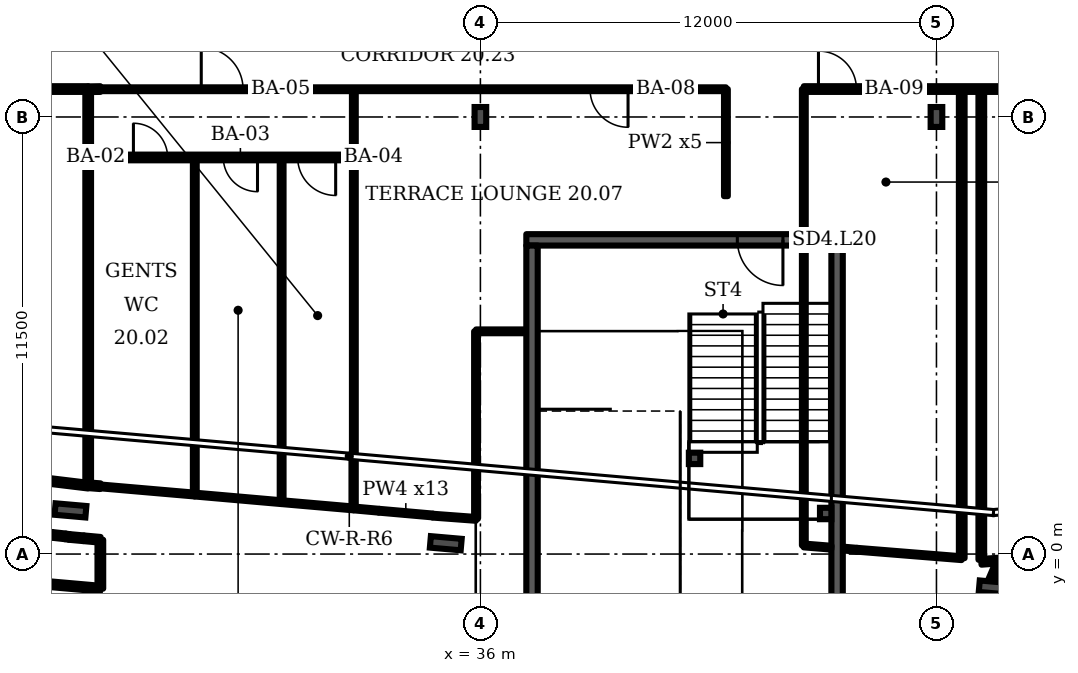
"""IFC4 building model, lengths in metres.
Left out: names, types, materials, properties, quantities, classifications, styles, units other than length and angle.
Written with IfcOpenShell. Run it as: python <this file> out.ifc"""

import sys

from ifc_helpers import new_model, si_unit, direction, frame, frame_2d, origin, origin_2d, place, context, subcontext, project, spatial, rectangle, i_section, extrude, element, fill, save


model = new_model("IFC4")
c1 = context("Model", 3, precision=1e-05, world=origin(), true_north=direction((0.0, 1.0)))
c2 = subcontext(c1, "Body", "Model", "MODEL_VIEW")
j1 = project(units=[si_unit("LENGTHUNIT", "METRE"), si_unit("PLANEANGLEUNIT", "RADIAN")], contexts=[c1])
p1 = place(None, origin())
s1 = spatial("IfcSite", under=j1, at=p1, CompositionType="ELEMENT")
p2 = place(p1, origin())
s2 = spatial("IfcBuilding", under=s1, at=p2, CompositionType="ELEMENT")
p3 = place(p2, frame((0.0, 0.0, 91.9)))
s3 = spatial("IfcBuildingStorey", under=s2, at=p3, CompositionType="ELEMENT", Elevation=91.9)
for number, where, z_axis, x_axis in (
    (1, (25.214, 1.149, 0.0), (0.0, 0.0, 1.0), (-0.087, -0.996, 0.0)),
    (2, (35.089, 0.285, 0.0), (0.0, 0.0, 1.0), (-0.087, -0.996, 0.0)),
    (3, (49.531, -0.882, 0.0), (0.0, 0.0, 1.0), (-0.087, -0.996, 0.0)),
):
    element("IfcColumn", number, at=place(p3, frame(where, z_axis=z_axis, x_axis=x_axis)), inside=s3, PredefinedType="COLUMN", context=c2, shape_type="SweptSolid", body=[
        extrude(i_section(OverallWidth=0.303, OverallDepth=0.814, WebThickness=0.021, FlangeThickness=0.04, FilletRadius=0.03, at=origin_2d()), origin(), (0.0, 0.0, 1.0), 4.8),
    ])
for number, where, z_axis, x_axis in (
    (4, (36.0, 11.5, 0.0), (0.0, 0.0, 1.0), (1.0, 0.0, 0.0)),
    (5, (48.0, 11.5, 0.0), (0.0, 0.0, 1.0), (1.0, 0.0, 0.0)),
):
    element("IfcColumn", number, at=place(p3, frame(where, z_axis=z_axis, x_axis=x_axis)), inside=s3, PredefinedType="COLUMN", context=c2, shape_type="SweptSolid", body=[
        extrude(i_section(OverallWidth=0.306, OverallDepth=0.524, WebThickness=0.021, FlangeThickness=0.04, FilletRadius=0.027, at=origin_2d()), origin(), (0.0, 0.0, 1.0), 4.8),
    ])
p4 = place(p3, frame((37.208, 8.267, 0.0), z_axis=(0.0, 0.0, 1.0), x_axis=(1.0, 0.0, 0.0)))
e6 = element("IfcWall", 6, at=p4, inside=s3, PredefinedType="SHEAR", context=c2, shape_type="SweptSolid", body=[
    extrude(rectangle(XDim=8.327, YDim=0.3, at=frame_2d((4.164, 0.0))), origin(), (0.0, 0.0, 1.0), 4.4),
])
p5 = place(p4, frame((5.552, 0.0, 0.0)))
e7 = element("IfcOpeningElement", 7, at=p5, cuts=e6, PredefinedType="OPENING", context=c2, shape_type="SweptSolid", body=[
    extrude(rectangle(XDim=1.2, YDim=2.1, at=frame_2d((0.6, 1.05))), frame((0.0, 0.16, 0.0), z_axis=(0.0, -1.0, 0.0), x_axis=(1.0, 0.0, 0.0)), (0.0, 0.0, 1.0), 0.32),
])
p6 = place(p3, frame((0.02, 12.235, 0.0), z_axis=(0.0, 0.0, 1.0), x_axis=(1.0, 0.0, 0.0)))
e8 = element("IfcWall", 8, at=p6, inside=s3, PredefinedType="PARTITIONING", context=c2, shape_type="SweptSolid", body=[
    extrude(rectangle(XDim=25.66, YDim=0.15, at=frame_2d((12.83, 0.0))), origin(), (0.0, 0.0, 1.0), 4.4),
])
p7 = place(p6, frame((5.805, 0.0, 0.0)))
e9 = element("IfcOpeningElement", 9, at=p7, cuts=e8, PredefinedType="OPENING", context=c2, shape_type="SweptSolid", body=[
    extrude(rectangle(XDim=1.0, YDim=2.1, at=frame_2d((0.5, 1.05))), frame((0.0, 0.085, 0.0), z_axis=(0.0, -1.0, 0.0), x_axis=(1.0, 0.0, 0.0)), (0.0, 0.0, 1.0), 0.17),
])
p8 = place(p6, frame((18.675, 0.0, 0.0)))
e10 = element("IfcOpeningElement", 10, at=p8, cuts=e8, PredefinedType="OPENING", context=c2, shape_type="SweptSolid", body=[
    extrude(rectangle(XDim=1.0, YDim=2.1, at=frame_2d((0.5, 1.05))), frame((0.0, 0.085, 0.0), z_axis=(0.0, -1.0, 0.0), x_axis=(1.0, 0.0, 0.0)), (0.0, 0.0, 1.0), 0.17),
])
p9 = place(p3, frame((24.725, 0.505, 0.0), z_axis=(0.0, 0.0, 1.0), x_axis=(-0.992649, 0.121018, 0.0)))
e11 = element("IfcWall", 11, at=p9, inside=s3, PredefinedType="PARTITIONING", context=c2, shape_type="SweptSolid", body=[
    extrude(rectangle(XDim=10.371, YDim=0.15, at=frame_2d((5.186, 0.0))), origin(), (0.0, 0.0, 1.0), 4.4),
])
p10 = place(p3, frame((25.08, 0.465, 0.0), z_axis=(0.0, 0.0, 1.0), x_axis=(-0.993778, 0.111407, 0.0)))
e12 = element("IfcWall", 12, at=p10, inside=s3, PredefinedType="PARTITIONING", context=c2, shape_type="SweptSolid", body=[
    extrude(rectangle(XDim=0.357, YDim=0.15, at=frame_2d((0.179, 0.0))), origin(), (0.0, 0.0, 1.0), 4.4),
])
p11 = place(p3, frame((25.18, 0.45, 0.0), z_axis=(0.0, 0.0, 1.0), x_axis=(-0.988705, 0.149877, 0.0)))
e13 = element("IfcWall", 13, at=p11, inside=s3, PredefinedType="PARTITIONING", context=c2, shape_type="SweptSolid", body=[
    extrude(rectangle(XDim=0.101, YDim=0.15, at=frame_2d((0.051, 0.0))), origin(), (0.0, 0.0, 1.0), 4.4),
])
p12 = place(p3, frame((25.56, 0.415, 0.0), z_axis=(0.0, 0.0, 1.0), x_axis=(-0.995805, 0.091458, 0.0)))
e14 = element("IfcWall", 14, at=p12, inside=s3, PredefinedType="PARTITIONING", context=c2, shape_type="SweptSolid", body=[
    extrude(rectangle(XDim=0.382, YDim=0.15, at=frame_2d((0.191, 0.0))), origin(), (0.0, 0.0, 1.0), 4.4),
])
p13 = place(p3, frame((25.68, 1.8, 0.0), z_axis=(0.0, 0.0, 1.0), x_axis=(-0.992758, 0.12014, 0.0)))
e15 = element("IfcWall", 15, at=p13, inside=s3, PredefinedType="PARTITIONING", context=c2, shape_type="SweptSolid", body=[
    extrude(rectangle(XDim=11.691, YDim=0.15, at=frame_2d((5.845, 0.0))), origin(), (0.0, 0.0, 1.0), 4.4),
])
p14 = place(p3, frame((25.68, 1.81, 0.0), z_axis=(0.0, 0.0, 1.0), x_axis=(0.0, 1.0, 0.0)))
e16 = element("IfcWall", 16, at=p14, inside=s3, PredefinedType="PARTITIONING", context=c2, shape_type="SweptSolid", body=[
    extrude(rectangle(XDim=10.42, YDim=0.15, at=frame_2d((5.21, 0.0))), origin(), (0.0, 0.0, 1.0), 4.4),
])
p15 = place(p3, frame((25.68, 10.435, 0.0), z_axis=(0.0, 0.0, 1.0), x_axis=(1.0, 0.0, 0.0)))
e17 = element("IfcWall", 17, at=p15, inside=s3, PredefinedType="PARTITIONING", context=c2, shape_type="SweptSolid", body=[
    extrude(rectangle(XDim=6.985, YDim=0.15, at=frame_2d((3.493, 0.0))), origin(), (0.0, 0.0, 1.0), 4.4),
])
p16 = place(p15, frame((1.19, 0.0, 0.0)))
e18 = element("IfcOpeningElement", 18, at=p16, cuts=e17, PredefinedType="OPENING", context=c2, shape_type="SweptSolid", body=[
    extrude(rectangle(XDim=0.9, YDim=2.1, at=frame_2d((0.45, 1.05))), frame((0.0, 0.085, 0.0), z_axis=(0.0, -1.0, 0.0), x_axis=(1.0, 0.0, 0.0)), (0.0, 0.0, 1.0), 0.17),
])
p17 = place(p15, frame((3.555, 0.0, 0.0)))
e19 = element("IfcOpeningElement", 19, at=p17, cuts=e17, PredefinedType="OPENING", context=c2, shape_type="SweptSolid", body=[
    extrude(rectangle(XDim=0.9, YDim=2.1, at=frame_2d((0.45, 1.05))), frame((0.0, 0.085, 0.0), z_axis=(0.0, -1.0, 0.0), x_axis=(1.0, 0.0, 0.0)), (0.0, 0.0, 1.0), 0.17),
])
p18 = place(p15, frame((5.512, 0.0, 0.0)))
e20 = element("IfcOpeningElement", 20, at=p18, cuts=e17, PredefinedType="OPENING", context=c2, shape_type="SweptSolid", body=[
    extrude(rectangle(XDim=1.0, YDim=2.1, at=frame_2d((0.5, 1.05))), frame((0.0, 0.085, 0.0), z_axis=(0.0, -1.0, 0.0), x_axis=(1.0, 0.0, 0.0)), (0.0, 0.0, 1.0), 0.17),
])
p19 = place(p3, frame((25.68, 12.23, 0.0), z_axis=(0.0, 0.0, 1.0), x_axis=(0.999868, 0.016016, 0.0)))
e21 = element("IfcWall", 21, at=p19, inside=s3, PredefinedType="PARTITIONING", context=c2, shape_type="SweptSolid", body=[
    extrude(rectangle(XDim=0.32, YDim=0.15, at=frame_2d((0.16, 0.0))), origin(), (0.0, 0.0, 1.0), 4.4),
])
p20 = place(p3, frame((26.0, -0.91, 0.0), z_axis=(0.0, 0.0, 1.0), x_axis=(0.0, 1.0, 0.0)))
e22 = element("IfcWall", 22, at=p20, inside=s3, PredefinedType="PARTITIONING", context=c2, shape_type="SweptSolid", body=[
    extrude(rectangle(XDim=1.285, YDim=0.15, at=frame_2d((0.643, 0.0))), origin(), (0.0, 0.0, 1.0), 4.4),
])
p21 = place(p3, frame((26.0, -0.91, 0.0), z_axis=(0.0, 0.0, 1.0), x_axis=(-0.996159, 0.087597, 0.0)))
e23 = element("IfcWall", 23, at=p21, inside=s3, PredefinedType="PARTITIONING", context=c2, shape_type="SweptSolid", body=[
    extrude(rectangle(XDim=6.068, YDim=0.15, at=frame_2d((3.034, 0.0))), origin(), (0.0, 0.0, 1.0), 4.4),
])
p22 = place(p3, frame((26.0, 0.375, 0.0), z_axis=(0.0, 0.0, 1.0), x_axis=(-0.99588, 0.090635, 0.0)))
e24 = element("IfcWall", 24, at=p22, inside=s3, PredefinedType="PARTITIONING", context=c2, shape_type="SweptSolid", body=[
    extrude(rectangle(XDim=0.442, YDim=0.15, at=frame_2d((0.221, 0.0))), origin(), (0.0, 0.0, 1.0), 4.4),
])
p23 = place(p3, frame((26.0, 12.23, 0.0), z_axis=(0.0, 0.0, 1.0), x_axis=(1.0, 0.0, 0.0)))
e25 = element("IfcWall", 25, at=p23, inside=s3, PredefinedType="PARTITIONING", context=c2, shape_type="SweptSolid", body=[
    extrude(rectangle(XDim=16.46, YDim=0.1, at=frame_2d((8.23, 0.0))), origin(), (0.0, 0.0, 1.0), 4.4),
])
p24 = place(p23, frame((2.655, 0.0, 0.0)))
e26 = element("IfcOpeningElement", 26, at=p24, cuts=e25, PredefinedType="OPENING", context=c2, shape_type="SweptSolid", body=[
    extrude(rectangle(XDim=1.1, YDim=2.1, at=frame_2d((0.55, 1.05))), frame((0.0, 0.06, 0.0), z_axis=(0.0, -1.0, 0.0), x_axis=(1.0, 0.0, 0.0)), (0.0, 0.0, 1.0), 0.12),
])
p25 = place(p23, frame((12.885, 0.0, 0.0)))
e27 = element("IfcOpeningElement", 27, at=p25, cuts=e25, PredefinedType="OPENING", context=c2, shape_type="SweptSolid", body=[
    extrude(rectangle(XDim=1.0, YDim=2.1, at=frame_2d((0.5, 1.05))), frame((0.0, 0.06, 0.0), z_axis=(0.0, -1.0, 0.0), x_axis=(1.0, 0.0, 0.0)), (0.0, 0.0, 1.0), 0.12),
])
p26 = place(p3, frame((26.0, 1.785, 0.0), z_axis=(0.0, 0.0, 1.0), x_axis=(-0.996932, 0.078325, 0.0)))
e28 = element("IfcWall", 28, at=p26, inside=s3, PredefinedType="PARTITIONING", context=c2, shape_type="SweptSolid", body=[
    extrude(rectangle(XDim=0.321, YDim=0.15, at=frame_2d((0.161, 0.0))), origin(), (0.0, 0.0, 1.0), 4.4),
])
p27 = place(p3, frame((28.485, 1.565, 0.0), z_axis=(0.0, 0.0, 1.0), x_axis=(-0.996271, 0.086228, 0.0)))
e29 = element("IfcWall", 29, at=p27, inside=s3, PredefinedType="PARTITIONING", context=c2, shape_type="SweptSolid", body=[
    extrude(rectangle(XDim=2.494, YDim=0.1, at=frame_2d((1.247, 0.0))), origin(), (0.0, 0.0, 1.0), 4.4),
])
p28 = place(p3, frame((28.485, 1.565, 0.0), z_axis=(0.0, 0.0, 1.0), x_axis=(0.0, 1.0, 0.0)))
e30 = element("IfcWall", 30, at=p28, inside=s3, PredefinedType="PARTITIONING", context=c2, shape_type="SweptSolid", body=[
    extrude(rectangle(XDim=8.87, YDim=0.1, at=frame_2d((4.435, 0.0))), origin(), (0.0, 0.0, 1.0), 4.4),
])
p29 = place(p3, frame((30.765, 1.365, 0.0), z_axis=(0.0, 0.0, 1.0), x_axis=(-0.996179, 0.087371, 0.0)))
e31 = element("IfcWall", 31, at=p29, inside=s3, PredefinedType="PARTITIONING", context=c2, shape_type="SweptSolid", body=[
    extrude(rectangle(XDim=2.289, YDim=0.1, at=frame_2d((1.144, 0.0))), origin(), (0.0, 0.0, 1.0), 4.4),
])
p30 = place(p3, frame((30.77, 1.365, 0.0), z_axis=(0.0, 0.0, 1.0), x_axis=(0.0, 1.0, 0.0)))
e32 = element("IfcWall", 32, at=p30, inside=s3, PredefinedType="PARTITIONING", context=c2, shape_type="SweptSolid", body=[
    extrude(rectangle(XDim=9.07, YDim=0.1, at=frame_2d((4.535, 0.0))), origin(), (0.0, 0.0, 1.0), 4.4),
])
p31 = place(p3, frame((32.665, 1.2, 0.0), z_axis=(0.0, 0.0, 1.0), x_axis=(-0.996233, 0.086763, 0.0)))
e33 = element("IfcWall", 33, at=p31, inside=s3, PredefinedType="PARTITIONING", context=c2, shape_type="SweptSolid", body=[
    extrude(rectangle(XDim=1.902, YDim=0.1, at=frame_2d((0.951, 0.0))), origin(), (0.0, 0.0, 1.0), 4.4),
])
p32 = place(p3, frame((32.67, 1.2, 0.0), z_axis=(0.0, 0.0, 1.0), x_axis=(0.0, 1.0, 0.0)))
e34 = element("IfcWall", 34, at=p32, inside=s3, PredefinedType="PARTITIONING", context=c2, shape_type="SweptSolid", body=[
    extrude(rectangle(XDim=11.03, YDim=0.1, at=frame_2d((5.515, 0.0))), origin(), (0.0, 0.0, 1.0), 4.4),
])
p33 = place(p3, frame((33.33, 1.14, 0.0), z_axis=(0.0, 0.0, 1.0), x_axis=(-0.995885, 0.090602, 0.0)))
e35 = element("IfcWall", 35, at=p33, inside=s3, PredefinedType="PARTITIONING", context=c2, shape_type="SweptSolid", body=[
    extrude(rectangle(XDim=0.663, YDim=0.1, at=frame_2d((0.332, 0.0))), origin(), (0.0, 0.0, 1.0), 4.4),
])
p34 = place(p3, frame((34.745, 1.015, 0.0), z_axis=(0.0, 0.0, 1.0), x_axis=(-0.99612, 0.087994, 0.0)))
e36 = element("IfcWall", 36, at=p34, inside=s3, PredefinedType="PARTITIONING", context=c2, shape_type="SweptSolid", body=[
    extrude(rectangle(XDim=1.421, YDim=0.1, at=frame_2d((0.71, 0.0))), origin(), (0.0, 0.0, 1.0), 4.4),
])
p35 = place(p3, frame((35.885, 0.925, 0.0), z_axis=(0.0, 0.0, 1.0), x_axis=(-0.997235, 0.074344, 0.0)))
e37 = element("IfcWall", 37, at=p35, inside=s3, PredefinedType="PARTITIONING", context=c2, shape_type="SweptSolid", body=[
    extrude(rectangle(XDim=1.143, YDim=0.1, at=frame_2d((0.571, 0.0))), origin(), (0.0, 0.0, 1.0), 4.4),
])
p36 = place(p3, frame((35.885, 0.925, 0.0), z_axis=(0.0, 0.0, 1.0), x_axis=(0.0, 1.0, 0.0)))
e38 = element("IfcWall", 38, at=p36, inside=s3, PredefinedType="PARTITIONING", context=c2, shape_type="SweptSolid", body=[
    extrude(rectangle(XDim=4.935, YDim=0.1, at=frame_2d((2.468, 0.0))), origin(), (0.0, 0.0, 1.0), 4.4),
])
p37 = place(p3, frame((35.885, 5.86, 0.0), z_axis=(0.0, 0.0, 1.0), x_axis=(1.0, 0.0, 0.0)))
e39 = element("IfcWall", 39, at=p37, inside=s3, PredefinedType="PARTITIONING", context=c2, shape_type="SweptSolid", body=[
    extrude(rectangle(XDim=1.303, YDim=0.1, at=frame_2d((0.652, 0.0))), origin(), (0.0, 0.0, 1.0), 4.4),
])
p38 = place(p3, frame((42.46, 9.417, 0.0), z_axis=(0.0, 0.0, 1.0), x_axis=(0.0, 1.0, 0.0)))
e40 = element("IfcWall", 40, at=p38, inside=s3, PredefinedType="PARTITIONING", context=c2, shape_type="SweptSolid", body=[
    extrude(rectangle(XDim=2.818, YDim=0.1, at=frame_2d((1.409, 0.0))), origin(), (0.0, 0.0, 1.0), 4.4),
])
p39 = place(p3, frame((44.51, 0.226, 0.0), z_axis=(0.0, 0.0, 1.0), x_axis=(0.0, 1.0, 0.0)))
e41 = element("IfcWall", 41, at=p39, inside=s3, PredefinedType="PARTITIONING", context=c2, shape_type="SweptSolid", body=[
    extrude(rectangle(XDim=7.891, YDim=0.1, at=frame_2d((3.945, 0.0))), origin(), (0.0, 0.0, 1.0), 4.4),
])
p40 = place(p3, frame((44.51, 12.235, 0.0), z_axis=(0.0, 0.0, 1.0), x_axis=(1.0, 0.0, 0.0)))
e42 = element("IfcWall", 42, at=p40, inside=s3, PredefinedType="PARTITIONING", context=c2, shape_type="SweptSolid", body=[
    extrude(rectangle(XDim=29.305, YDim=0.15, at=frame_2d((14.652, 0.0))), origin(), (0.0, 0.0, 1.0), 4.4),
])
p41 = place(p40, frame((0.385, 0.0, 0.0)))
e43 = element("IfcOpeningElement", 43, at=p41, cuts=e42, PredefinedType="OPENING", context=c2, shape_type="SweptSolid", body=[
    extrude(rectangle(XDim=1.0, YDim=2.1, at=frame_2d((0.5, 1.05))), frame((0.0, 0.085, 0.0), z_axis=(0.0, -1.0, 0.0), x_axis=(1.0, 0.0, 0.0)), (0.0, 0.0, 1.0), 0.17),
])
p42 = place(p40, frame((9.513, 0.0, 0.0)))
e44 = element("IfcOpeningElement", 44, at=p42, cuts=e42, PredefinedType="OPENING", context=c2, shape_type="SweptSolid", body=[
    extrude(rectangle(XDim=1.0, YDim=2.1, at=frame_2d((0.5, 1.05))), frame((0.0, 0.085, 0.0), z_axis=(0.0, -1.0, 0.0), x_axis=(1.0, 0.0, 0.0)), (0.0, 0.0, 1.0), 0.17),
])
p43 = place(p40, frame((22.585, 0.0, 0.0)))
e45 = element("IfcOpeningElement", 45, at=p43, cuts=e42, PredefinedType="OPENING", context=c2, shape_type="SweptSolid", body=[
    extrude(rectangle(XDim=1.0, YDim=2.1, at=frame_2d((0.5, 1.05))), frame((0.0, 0.085, 0.0), z_axis=(0.0, -1.0, 0.0), x_axis=(1.0, 0.0, 0.0)), (0.0, 0.0, 1.0), 0.17),
])
p44 = place(p3, frame((45.235, 0.167, 0.0), z_axis=(0.0, 0.0, 1.0), x_axis=(-0.996727, 0.080852, 0.0)))
e46 = element("IfcWall", 46, at=p44, inside=s3, PredefinedType="PARTITIONING", context=c2, shape_type="SweptSolid", body=[
    extrude(rectangle(XDim=0.728, YDim=0.1, at=frame_2d((0.364, 0.0))), origin(), (0.0, 0.0, 1.0), 4.4),
])
p45 = place(p3, frame((45.901, 0.114, 0.0), z_axis=(0.0, 0.0, 1.0), x_axis=(-0.996419, 0.084502, 0.0)))
e47 = element("IfcWall", 47, at=p45, inside=s3, PredefinedType="PARTITIONING", context=c2, shape_type="SweptSolid", body=[
    extrude(rectangle(XDim=0.347, YDim=0.1, at=frame_2d((0.173, 0.0))), origin(), (0.0, 0.0, 1.0), 4.4),
])
p46 = place(p3, frame((48.665, -0.109, 0.0), z_axis=(0.0, 0.0, 1.0), x_axis=(-0.996746, 0.080553, 0.0)))
e48 = element("IfcWall", 48, at=p46, inside=s3, PredefinedType="PARTITIONING", context=c2, shape_type="SweptSolid", body=[
    extrude(rectangle(XDim=2.773, YDim=0.1, at=frame_2d((1.387, 0.0))), origin(), (0.0, 0.0, 1.0), 4.4),
])
p47 = place(p3, frame((48.665, -0.109, 0.0), z_axis=(0.0, 0.0, 1.0), x_axis=(0.0, 1.0, 0.0)))
e49 = element("IfcWall", 49, at=p47, inside=s3, PredefinedType="PARTITIONING", context=c2, shape_type="SweptSolid", body=[
    extrude(rectangle(XDim=12.344, YDim=0.15, at=frame_2d((6.172, 0.0))), origin(), (0.0, 0.0, 1.0), 4.4),
])
p48 = place(p3, frame((48.725, -2.35, 0.0), z_axis=(0.0, 0.0, 1.0), x_axis=(0.393869, 0.919165, 0.0)))
e50 = element("IfcWall", 50, at=p48, inside=s3, PredefinedType="PARTITIONING", context=c2, shape_type="SweptSolid", body=[
    extrude(rectangle(XDim=2.372, YDim=0.15, at=frame_2d((1.186, 0.0))), origin(), (0.0, 0.0, 1.0), 4.4),
])
p49 = place(p3, frame((49.18, -0.205, 0.0), z_axis=(0.0, 0.0, 1.0), x_axis=(0.997271, 0.073796, 0.0)))
e51 = element("IfcWall", 51, at=p49, inside=s3, PredefinedType="PARTITIONING", context=c2, shape_type="SweptSolid", body=[
    extrude(rectangle(XDim=0.476, YDim=0.15, at=frame_2d((0.238, 0.0))), origin(), (0.0, 0.0, 1.0), 4.4),
])
p50 = place(p3, frame((49.18, -0.15, 0.0), z_axis=(0.0, 0.0, 1.0), x_axis=(0.0, 1.0, 0.0)))
e52 = element("IfcWall", 52, at=p50, inside=s3, PredefinedType="PARTITIONING", context=c2, shape_type="SweptSolid", body=[
    extrude(rectangle(XDim=12.345, YDim=0.15, at=frame_2d((6.172, 0.0))), origin(), (0.0, 0.0, 1.0), 4.4),
])
p51 = place(p3, frame((44.51, 8.417, 0.0), z_axis=(0.0, 0.0, 1.0), x_axis=(0.0, 1.0, 0.0)))
e53 = element("IfcWall", 53, at=p51, inside=s3, PredefinedType="PARTITIONING", context=c2, shape_type="SweptSolid", body=[
    extrude(rectangle(XDim=3.818, YDim=0.1, at=frame_2d((1.909, 0.0))), origin(), (0.0, 0.0, 1.0), 4.4),
])
for number, where, z_axis, x_axis in (
    (54, (37.358, -1.939, 0.0), (0.0, 0.0, 1.0), (0.0, 1.0, 0.0)),
    (55, (45.385, -1.939, 0.0), (0.0, 0.0, 1.0), (0.0, 1.0, 0.0)),
):
    element("IfcWall", number, at=place(p3, frame(where, z_axis=z_axis, x_axis=x_axis)), inside=s3, PredefinedType="SHEAR", context=c2, shape_type="SweptSolid", body=[
        extrude(rectangle(XDim=10.056, YDim=0.3, at=frame_2d((5.028, 0.0))), origin(), (0.0, 0.0, 1.0), 4.4),
    ])
for number, where, z_axis, x_axis in (
    (56, (41.635, 2.517, 0.0), (0.0, 0.0, 1.0), (1.0, 0.0, 0.0)),
    (57, (45.085, 1.067, 0.0), (0.0, 0.0, 1.0), (1.0, 0.0, 0.0)),
):
    element("IfcColumn", number, at=place(p3, frame(where, z_axis=z_axis, x_axis=x_axis)), inside=s3, PredefinedType="COLUMN", context=c2, shape_type="SweptSolid", body=[
        extrude(rectangle(XDim=0.3, YDim=0.3, at=origin_2d()), origin(), (0.0, 0.0, 1.0), 2.2),
    ])
p52 = place(p5, origin())
e58 = element("IfcDoor", 58, at=p52, inside=s3, OperationType="SINGLE_SWING_RIGHT", PredefinedType="DOOR", context=c2, shape_type="SweptSolid", body=[
    extrude(rectangle(XDim=1.2, YDim=2.1, at=frame_2d((0.6, 1.05))), frame((0.0, 0.025, 0.0), z_axis=(0.0, -1.0, 0.0), x_axis=(1.0, 0.0, 0.0)), (0.0, 0.0, 1.0), 0.05),
])
fill(e7, e58)
p53 = place(p16, origin())
e59 = element("IfcDoor", 59, at=p53, inside=s3, OperationType="SINGLE_SWING_LEFT", PredefinedType="DOOR", context=c2, shape_type="SweptSolid", body=[
    extrude(rectangle(XDim=0.9, YDim=2.1, at=frame_2d((0.45, 1.05))), frame((0.0, 0.025, 0.0), z_axis=(0.0, -1.0, 0.0), x_axis=(1.0, 0.0, 0.0)), (0.0, 0.0, 1.0), 0.05),
])
fill(e18, e59)
p54 = place(p17, origin())
e60 = element("IfcDoor", 60, at=p54, inside=s3, OperationType="SINGLE_SWING_RIGHT", PredefinedType="DOOR", context=c2, shape_type="SweptSolid", body=[
    extrude(rectangle(XDim=0.9, YDim=2.1, at=frame_2d((0.45, 1.05))), frame((0.0, 0.025, 0.0), z_axis=(0.0, -1.0, 0.0), x_axis=(1.0, 0.0, 0.0)), (0.0, 0.0, 1.0), 0.05),
])
fill(e19, e60)
p55 = place(p18, origin())
e61 = element("IfcDoor", 61, at=p55, inside=s3, OperationType="SINGLE_SWING_RIGHT", PredefinedType="DOOR", context=c2, shape_type="SweptSolid", body=[
    extrude(rectangle(XDim=1.0, YDim=2.1, at=frame_2d((0.5, 1.05))), frame((0.0, 0.025, 0.0), z_axis=(0.0, -1.0, 0.0), x_axis=(1.0, 0.0, 0.0)), (0.0, 0.0, 1.0), 0.05),
])
fill(e20, e61)
p56 = place(p24, origin())
e62 = element("IfcDoor", 62, at=p56, inside=s3, OperationType="SINGLE_SWING_LEFT", PredefinedType="DOOR", context=c2, shape_type="SweptSolid", body=[
    extrude(rectangle(XDim=1.1, YDim=2.1, at=frame_2d((0.55, 1.05))), frame((0.0, 0.025, 0.0), z_axis=(0.0, -1.0, 0.0), x_axis=(1.0, 0.0, 0.0)), (0.0, 0.0, 1.0), 0.05),
])
fill(e26, e62)
p57 = place(p25, origin())
e63 = element("IfcDoor", 63, at=p57, inside=s3, OperationType="SINGLE_SWING_RIGHT", PredefinedType="DOOR", context=c2, shape_type="SweptSolid", body=[
    extrude(rectangle(XDim=1.0, YDim=2.1, at=frame_2d((0.5, 1.05))), frame((0.0, 0.025, 0.0), z_axis=(0.0, -1.0, 0.0), x_axis=(1.0, 0.0, 0.0)), (0.0, 0.0, 1.0), 0.05),
])
fill(e27, e63)
p58 = place(p41, origin())
e64 = element("IfcDoor", 64, at=p58, inside=s3, OperationType="SINGLE_SWING_LEFT", PredefinedType="DOOR", context=c2, shape_type="SweptSolid", body=[
    extrude(rectangle(XDim=1.0, YDim=2.1, at=frame_2d((0.5, 1.05))), frame((0.0, 0.025, 0.0), z_axis=(0.0, -1.0, 0.0), x_axis=(1.0, 0.0, 0.0)), (0.0, 0.0, 1.0), 0.05),
])
fill(e43, e64)
save(model, sys.argv[1])
